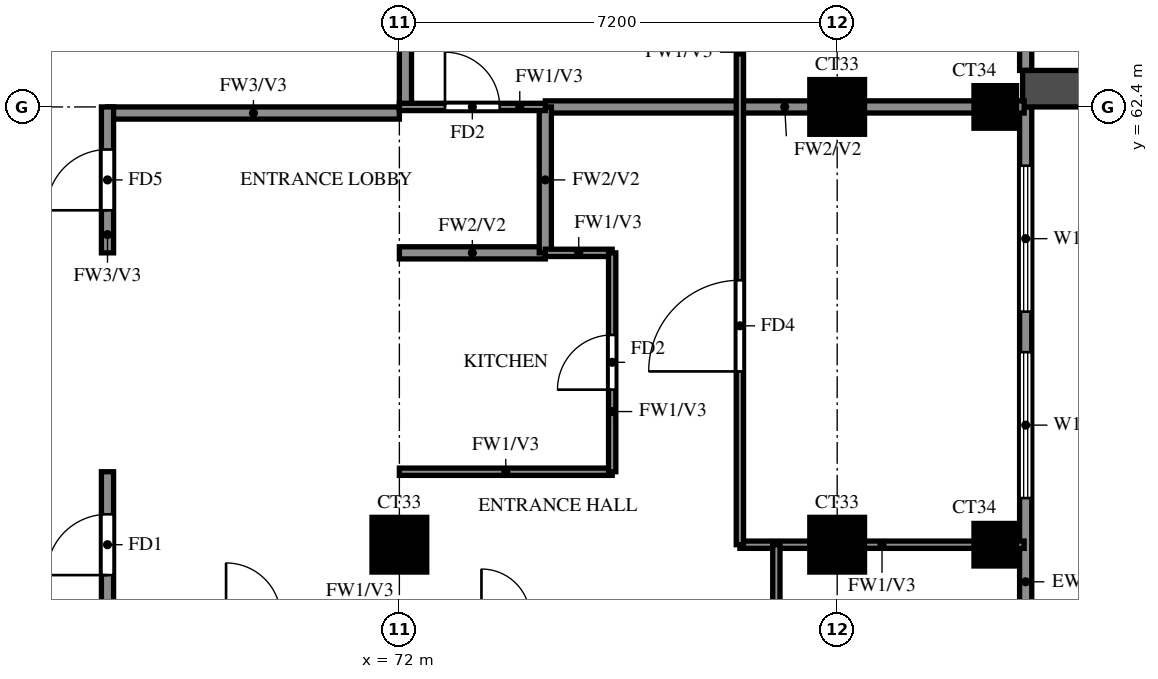
"""IFC4 building model, lengths in metres.
Left out: names, types, materials, properties, quantities, classifications, styles, units other than length and angle.
Written with IfcOpenShell. Run it as: python <this file> out.ifc"""

import sys

from ifc_helpers import new_model, si_unit, direction, frame, frame_2d, origin, origin_2d, place, context, subcontext, project, spatial, rectangle, extrude, source, transform, mapped, element, fill, save


model = new_model("IFC4")
c1 = context("Model", 3, precision=1e-05, world=origin(), true_north=direction((0.0, 1.0)))
c2 = subcontext(c1, "Body", "Model", "MODEL_VIEW")
j1 = project(units=[si_unit("LENGTHUNIT", "METRE"), si_unit("PLANEANGLEUNIT", "RADIAN")], contexts=[c1])
p1 = place(None, origin())
s1 = spatial("IfcSite", under=j1, at=p1, CompositionType="ELEMENT")
p2 = place(p1, origin())
s2 = spatial("IfcBuilding", under=s1, at=p2, CompositionType="ELEMENT")
p3 = place(p2, frame((0.0, 0.0, 229.0)))
s3 = spatial("IfcBuildingStorey", under=s2, at=p3, CompositionType="ELEMENT", Elevation=229.0)
m1 = source(origin(), c2, "Body", "SweptSolid", [
    extrude(rectangle(XDim=0.9, YDim=0.9, at=origin_2d()), origin(), (0.0, 0.0, 1.0), 3.22),
])
for number, where, z_axis, x_axis in (
    (1, (72.0, 55.2, 0.0), (0.0, 0.0, 1.0), (1.0, 0.0, 0.0)),
    (2, (79.2, 55.2, 0.0), (0.0, 0.0, 1.0), (1.0, 0.0, 0.0)),
):
    element("IfcColumn", number, at=place(p3, frame(where, z_axis=z_axis, x_axis=x_axis)), inside=s3, PredefinedType="COLUMN", context=c2, shape_type="MappedRepresentation", body=[
        mapped(m1, transform((0.0, 0.0, 0.0))),
    ])
m2 = source(origin(), c2, "Body", "SweptSolid", [
    extrude(rectangle(XDim=0.7, YDim=0.7, at=origin_2d()), origin(), (0.0, 0.0, 1.0), 3.22),
])
p4 = place(p3, frame((81.8, 55.2, 0.0), z_axis=(0.0, 0.0, 1.0), x_axis=(1.0, 0.0, 0.0)))
e3 = element("IfcColumn", 3, at=p4, inside=s3, PredefinedType="COLUMN", context=c2, shape_type="MappedRepresentation", body=[
    mapped(m2, transform((0.0, 0.0, 0.0))),
])
p5 = place(p3, frame((79.2, 62.4, 0.0), z_axis=(0.0, 0.0, 1.0), x_axis=(1.0, 0.0, 0.0)))
e4 = element("IfcColumn", 4, at=p5, inside=s3, PredefinedType="COLUMN", context=c2, shape_type="MappedRepresentation", body=[
    mapped(m1, transform((0.0, 0.0, 0.0))),
])
p6 = place(p3, frame((81.8, 62.4, 0.0), z_axis=(0.0, 0.0, 1.0), x_axis=(1.0, 0.0, 0.0)))
e5 = element("IfcColumn", 5, at=p6, inside=s3, PredefinedType="COLUMN", context=c2, shape_type="MappedRepresentation", body=[
    mapped(m2, transform((0.0, 0.0, 0.0))),
])
p7 = place(p3, frame((82.3, 48.2, 0.0), z_axis=(0.0, 0.0, 1.0), x_axis=(0.0, 1.0, 0.0)))
e6 = element("IfcWall", 6, at=p7, inside=s3, PredefinedType="SOLIDWALL", context=c2, shape_type="SweptSolid", body=[
    extrude(rectangle(XDim=14.2, YDim=0.2, at=frame_2d((7.1, 0.0))), origin(), (0.0, 0.0, 1.0), 3.22),
])
p8 = place(p7, frame((0.6, 0.0, 0.6)))
e7 = element("IfcOpeningElement", 7, at=p8, cuts=e6, PredefinedType="OPENING", context=c2, shape_type="SweptSolid", body=[
    extrude(rectangle(XDim=2.4, YDim=2.4, at=frame_2d((1.2, 1.2))), frame((0.0, 0.11, 0.0), z_axis=(0.0, -1.0, 0.0), x_axis=(1.0, 0.0, 0.0)), (0.0, 0.0, 1.0), 0.22),
])
p9 = place(p7, frame((4.75, 0.0, 1.5)))
e8 = element("IfcOpeningElement", 8, at=p9, cuts=e6, PredefinedType="OPENING", context=c2, shape_type="SweptSolid", body=[
    extrude(rectangle(XDim=0.9, YDim=0.9, at=frame_2d((0.45, 0.45))), frame((0.0, 0.11, 0.0), z_axis=(0.0, -1.0, 0.0), x_axis=(1.0, 0.0, 0.0)), (0.0, 0.0, 1.0), 0.22),
])
p10 = place(p7, frame((7.767, 0.0, 0.6)))
e9 = element("IfcOpeningElement", 9, at=p10, cuts=e6, PredefinedType="OPENING", context=c2, shape_type="SweptSolid", body=[
    extrude(rectangle(XDim=2.4, YDim=2.4, at=frame_2d((1.2, 1.2))), frame((0.0, 0.11, 0.0), z_axis=(0.0, -1.0, 0.0), x_axis=(1.0, 0.0, 0.0)), (0.0, 0.0, 1.0), 0.22),
])
p11 = place(p7, frame((10.833, 0.0, 0.6)))
e10 = element("IfcOpeningElement", 10, at=p11, cuts=e6, PredefinedType="OPENING", context=c2, shape_type="SweptSolid", body=[
    extrude(rectangle(XDim=2.4, YDim=2.4, at=frame_2d((1.2, 1.2))), frame((0.0, 0.11, 0.0), z_axis=(0.0, -1.0, 0.0), x_axis=(1.0, 0.0, 0.0)), (0.0, 0.0, 1.0), 0.22),
])
p12 = place(p3, frame((82.3, 63.0, 0.0), z_axis=(0.0, 0.0, 1.0), x_axis=(0.0, 1.0, 0.0)))
e11 = element("IfcWall", 11, at=p12, inside=s3, PredefinedType="SOLIDWALL", context=c2, shape_type="SweptSolid", body=[
    extrude(rectangle(XDim=6.0, YDim=0.2, at=frame_2d((3.0, 0.0))), origin(), (0.0, 0.0, 1.0), 3.22),
])
p13 = place(p12, frame((0.9, 0.0, 0.0)))
e12 = element("IfcOpeningElement", 12, at=p13, cuts=e11, PredefinedType="OPENING", context=c2, shape_type="SweptSolid", body=[
    extrude(rectangle(XDim=1.8, YDim=2.4, at=frame_2d((0.9, 1.2))), frame((0.0, 0.11, 0.0), z_axis=(0.0, -1.0, 0.0), x_axis=(1.0, 0.0, 0.0)), (0.0, 0.0, 1.0), 0.22),
])
p14 = place(p12, frame((3.5, 0.0, 0.6)))
e13 = element("IfcOpeningElement", 13, at=p14, cuts=e11, PredefinedType="OPENING", context=c2, shape_type="SweptSolid", body=[
    extrude(rectangle(XDim=1.8, YDim=2.4, at=frame_2d((0.9, 1.2))), frame((0.0, 0.11, 0.0), z_axis=(0.0, -1.0, 0.0), x_axis=(1.0, 0.0, 0.0)), (0.0, 0.0, 1.0), 0.22),
])
p15 = place(p3, frame((82.25, 62.7, 0.0), z_axis=(0.0, 0.0, 1.0), x_axis=(1.0, 0.0, 0.0)))
e14 = element("IfcWall", 14, at=p15, inside=s3, PredefinedType="SOLIDWALL", context=c2, shape_type="SweptSolid", body=[
    extrude(rectangle(XDim=2.85, YDim=0.6, at=frame_2d((1.425, 0.0))), origin(), (0.0, 0.0, 1.0), 2.85),
])
p16 = place(p3, frame((67.2, 62.3, 0.0), z_axis=(0.0, 0.0, 1.0), x_axis=(1.0, 0.0, 0.0)))
e15 = element("IfcWall", 15, at=p16, inside=s3, PredefinedType="SOLIDWALL", context=c2, shape_type="SweptSolid", body=[
    extrude(rectangle(XDim=4.8, YDim=0.2, at=frame_2d((2.4, 0.0))), origin(), (0.0, 0.0, 1.0), 3.22),
])
p17 = place(p3, frame((67.2, 45.6, 0.0), z_axis=(0.0, 0.0, 1.0), x_axis=(0.0, 1.0, 0.0)))
e16 = element("IfcWall", 16, at=p17, inside=s3, PredefinedType="SOLIDWALL", context=c2, shape_type="SweptSolid", body=[
    extrude(rectangle(XDim=10.8, YDim=0.2, at=frame_2d((5.4, 0.0))), origin(), (0.0, 0.0, 1.0), 3.22),
])
p18 = place(p17, frame((9.1, 0.0, 0.0)))
e17 = element("IfcOpeningElement", 17, at=p18, cuts=e16, PredefinedType="OPENING", context=c2, shape_type="SweptSolid", body=[
    extrude(rectangle(XDim=1.0, YDim=2.1, at=frame_2d((0.5, 1.05))), frame((0.0, 0.11, 0.0), z_axis=(0.0, -1.0, 0.0), x_axis=(1.0, 0.0, 0.0)), (0.0, 0.0, 1.0), 0.22),
])
p19 = place(p17, frame((0.7, 0.0, 0.0)))
e18 = element("IfcOpeningElement", 18, at=p19, cuts=e16, PredefinedType="OPENING", context=c2, shape_type="SweptSolid", body=[
    extrude(rectangle(XDim=1.0, YDim=2.1, at=frame_2d((0.5, 1.05))), frame((0.0, 0.11, 0.0), z_axis=(0.0, -1.0, 0.0), x_axis=(1.0, 0.0, 0.0)), (0.0, 0.0, 1.0), 0.22),
])
p20 = place(p3, frame((67.2, 60.0, 0.0), z_axis=(0.0, 0.0, 1.0), x_axis=(0.0, 1.0, 0.0)))
e19 = element("IfcWall", 19, at=p20, inside=s3, PredefinedType="SOLIDWALL", context=c2, shape_type="SweptSolid", body=[
    extrude(rectangle(XDim=2.4, YDim=0.2, at=frame_2d((1.2, 0.0))), origin(), (0.0, 0.0, 1.0), 3.22),
])
p21 = place(p20, frame((0.7, 0.0, 0.0)))
e20 = element("IfcOpeningElement", 20, at=p21, cuts=e19, PredefinedType="OPENING", context=c2, shape_type="SweptSolid", body=[
    extrude(rectangle(XDim=1.0, YDim=2.1, at=frame_2d((0.5, 1.05))), frame((0.0, 0.11, 0.0), z_axis=(0.0, -1.0, 0.0), x_axis=(1.0, 0.0, 0.0)), (0.0, 0.0, 1.0), 0.22),
])
p22 = place(p3, frame((72.1, 62.4, 0.0), z_axis=(0.0, 0.0, 1.0), x_axis=(0.0, 1.0, 0.0)))
e21 = element("IfcWall", 21, at=p22, inside=s3, PredefinedType="SOLIDWALL", context=c2, shape_type="SweptSolid", body=[
    extrude(rectangle(XDim=15.6, YDim=0.2, at=frame_2d((7.8, 0.0))), origin(), (0.0, 0.0, 1.0), 3.22),
])
p23 = place(p3, frame((72.0, 60.0, 0.0), z_axis=(0.0, 0.0, 1.0), x_axis=(1.0, 0.0, 0.0)))
e22 = element("IfcWall", 22, at=p23, inside=s3, PredefinedType="SOLIDWALL", context=c2, shape_type="SweptSolid", body=[
    extrude(rectangle(XDim=2.4, YDim=0.2, at=frame_2d((1.2, 0.0))), origin(), (0.0, 0.0, 1.0), 3.22),
])
p24 = place(p3, frame((74.4, 62.4, 0.0), z_axis=(0.0, 0.0, 1.0), x_axis=(1.0, 0.0, 0.0)))
e23 = element("IfcWall", 23, at=p24, inside=s3, PredefinedType="SOLIDWALL", context=c2, shape_type="SweptSolid", body=[
    extrude(rectangle(XDim=7.875, YDim=0.2, at=frame_2d((3.938, 0.0))), origin(), (0.0, 0.0, 1.0), 3.22),
])
p25 = place(p3, frame((74.4, 60.0, 0.0), z_axis=(0.0, 0.0, 1.0), x_axis=(0.0, 1.0, 0.0)))
e24 = element("IfcWall", 24, at=p25, inside=s3, PredefinedType="SOLIDWALL", context=c2, shape_type="SweptSolid", body=[
    extrude(rectangle(XDim=2.4, YDim=0.2, at=frame_2d((1.2, 0.0))), origin(), (0.0, 0.0, 1.0), 3.22),
])
p26 = place(p3, frame((77.6, 55.2, 0.0), z_axis=(0.0, 0.0, 1.0), x_axis=(1.0, 0.0, 0.0)))
e25 = element("IfcWall", 25, at=p26, inside=s3, PredefinedType="PARTITIONING", context=c2, shape_type="SweptSolid", body=[
    extrude(rectangle(XDim=4.675, YDim=0.12, at=frame_2d((2.337, 0.0))), origin(), (0.0, 0.0, 1.0), 3.22),
])
p27 = place(p3, frame((72.0, 56.4, 0.0), z_axis=(0.0, 0.0, 1.0), x_axis=(1.0, 0.0, 0.0)))
e26 = element("IfcWall", 26, at=p27, inside=s3, PredefinedType="PARTITIONING", context=c2, shape_type="SweptSolid", body=[
    extrude(rectangle(XDim=3.5, YDim=0.12, at=frame_2d((1.75, 0.0))), origin(), (0.0, 0.0, 1.0), 3.22),
])
p28 = place(p3, frame((74.4, 60.0, 0.0), z_axis=(0.0, 0.0, 1.0), x_axis=(1.0, 0.0, 0.0)))
e27 = element("IfcWall", 27, at=p28, inside=s3, PredefinedType="PARTITIONING", context=c2, shape_type="SweptSolid", body=[
    extrude(rectangle(XDim=1.1, YDim=0.12, at=frame_2d((0.55, 0.0))), origin(), (0.0, 0.0, 1.0), 3.22),
])
p29 = place(p3, frame((72.0, 62.4, 0.0), z_axis=(0.0, 0.0, 1.0), x_axis=(1.0, 0.0, 0.0)))
e28 = element("IfcWall", 28, at=p29, inside=s3, PredefinedType="PARTITIONING", context=c2, shape_type="SweptSolid", body=[
    extrude(rectangle(XDim=2.4, YDim=0.12, at=frame_2d((1.2, 0.0))), origin(), (0.0, 0.0, 1.0), 3.22),
])
p30 = place(p29, frame((0.75, 0.0, 0.0)))
e29 = element("IfcOpeningElement", 29, at=p30, cuts=e28, PredefinedType="OPENING", context=c2, shape_type="SweptSolid", body=[
    extrude(rectangle(XDim=0.9, YDim=2.1, at=frame_2d((0.45, 1.05))), frame((0.0, 0.07, 0.0), z_axis=(0.0, -1.0, 0.0), x_axis=(1.0, 0.0, 0.0)), (0.0, 0.0, 1.0), 0.14),
])
p31 = place(p3, frame((75.5, 56.4, 0.0), z_axis=(0.0, 0.0, 1.0), x_axis=(0.0, 1.0, 0.0)))
e30 = element("IfcWall", 30, at=p31, inside=s3, PredefinedType="PARTITIONING", context=c2, shape_type="SweptSolid", body=[
    extrude(rectangle(XDim=3.6, YDim=0.12, at=frame_2d((1.8, 0.0))), origin(), (0.0, 0.0, 1.0), 3.22),
])
p32 = place(p31, frame((1.35, 0.0, 0.0)))
e31 = element("IfcOpeningElement", 31, at=p32, cuts=e30, PredefinedType="OPENING", context=c2, shape_type="SweptSolid", body=[
    extrude(rectangle(XDim=0.9, YDim=2.1, at=frame_2d((0.45, 1.05))), frame((0.0, 0.07, 0.0), z_axis=(0.0, -1.0, 0.0), x_axis=(1.0, 0.0, 0.0)), (0.0, 0.0, 1.0), 0.14),
])
p33 = place(p3, frame((77.6, 55.2, 0.0), z_axis=(0.0, 0.0, 1.0), x_axis=(0.0, 1.0, 0.0)))
e32 = element("IfcWall", 32, at=p33, inside=s3, PredefinedType="PARTITIONING", context=c2, shape_type="SweptSolid", body=[
    extrude(rectangle(XDim=18.0, YDim=0.12, at=frame_2d((9.0, 0.0))), origin(), (0.0, 0.0, 1.0), 3.22),
])
p34 = place(p33, frame((2.85, 0.0, 0.0)))
e33 = element("IfcOpeningElement", 33, at=p34, cuts=e32, PredefinedType="OPENING", context=c2, shape_type="SweptSolid", body=[
    extrude(rectangle(XDim=1.5, YDim=2.1, at=frame_2d((0.75, 1.05))), frame((0.0, 0.07, 0.0), z_axis=(0.0, -1.0, 0.0), x_axis=(1.0, 0.0, 0.0)), (0.0, 0.0, 1.0), 0.14),
])
p35 = place(p33, frame((8.55, 0.0, 0.0)))
e34 = element("IfcOpeningElement", 34, at=p35, cuts=e32, PredefinedType="OPENING", context=c2, shape_type="SweptSolid", body=[
    extrude(rectangle(XDim=0.9, YDim=2.1, at=frame_2d((0.45, 1.05))), frame((0.0, 0.07, 0.0), z_axis=(0.0, -1.0, 0.0), x_axis=(1.0, 0.0, 0.0)), (0.0, 0.0, 1.0), 0.14),
])
p36 = place(p33, frame((12.15, 0.0, 0.0)))
e35 = element("IfcOpeningElement", 35, at=p36, cuts=e32, PredefinedType="OPENING", context=c2, shape_type="SweptSolid", body=[
    extrude(rectangle(XDim=0.9, YDim=2.1, at=frame_2d((0.45, 1.05))), frame((0.0, 0.07, 0.0), z_axis=(0.0, -1.0, 0.0), x_axis=(1.0, 0.0, 0.0)), (0.0, 0.0, 1.0), 0.14),
])
p37 = place(p33, frame((15.75, 0.0, 0.0)))
e36 = element("IfcOpeningElement", 36, at=p37, cuts=e32, PredefinedType="OPENING", context=c2, shape_type="SweptSolid", body=[
    extrude(rectangle(XDim=0.9, YDim=2.1, at=frame_2d((0.45, 1.05))), frame((0.0, 0.07, 0.0), z_axis=(0.0, -1.0, 0.0), x_axis=(1.0, 0.0, 0.0)), (0.0, 0.0, 1.0), 0.14),
])
p38 = place(p3, frame((78.2, 51.6, 0.0), z_axis=(0.0, 0.0, 1.0), x_axis=(0.0, 1.0, 0.0)))
e37 = element("IfcWall", 37, at=p38, inside=s3, PredefinedType="PARTITIONING", context=c2, shape_type="SweptSolid", body=[
    extrude(rectangle(XDim=3.6, YDim=0.12, at=frame_2d((1.8, 0.0))), origin(), (0.0, 0.0, 1.0), 3.22),
])
p39 = place(p10, origin())
e38 = element("IfcWindow", 38, at=p39, inside=s3, PartitioningType="DOUBLE_PANEL_VERTICAL", PredefinedType="WINDOW", context=c2, shape_type="SweptSolid", body=[
    extrude(rectangle(XDim=2.4, YDim=2.4, at=frame_2d((1.2, 1.2))), frame((0.0, 0.03, 0.0), z_axis=(0.0, -1.0, 0.0), x_axis=(1.0, 0.0, 0.0)), (0.0, 0.0, 1.0), 0.06),
])
fill(e9, e38)
p40 = place(p11, origin())
e39 = element("IfcWindow", 39, at=p40, inside=s3, PartitioningType="DOUBLE_PANEL_VERTICAL", PredefinedType="WINDOW", context=c2, shape_type="SweptSolid", body=[
    extrude(rectangle(XDim=2.4, YDim=2.4, at=frame_2d((1.2, 1.2))), frame((0.0, 0.03, 0.0), z_axis=(0.0, -1.0, 0.0), x_axis=(1.0, 0.0, 0.0)), (0.0, 0.0, 1.0), 0.06),
])
fill(e10, e39)
p41 = place(p18, origin())
e40 = element("IfcDoor", 40, at=p41, inside=s3, OperationType="SINGLE_SWING_LEFT", PredefinedType="DOOR", context=c2, shape_type="SweptSolid", body=[
    extrude(rectangle(XDim=1.0, YDim=2.1, at=frame_2d((0.5, 1.05))), frame((0.0, 0.025, 0.0), z_axis=(0.0, -1.0, 0.0), x_axis=(1.0, 0.0, 0.0)), (0.0, 0.0, 1.0), 0.05),
])
fill(e17, e40)
p42 = place(p34, origin())
e41 = element("IfcDoor", 41, at=p42, inside=s3, OperationType="SINGLE_SWING_LEFT", PredefinedType="DOOR", context=c2, shape_type="SweptSolid", body=[
    extrude(rectangle(XDim=1.5, YDim=2.1, at=frame_2d((0.75, 1.05))), frame((0.0, 0.025, 0.0), z_axis=(0.0, -1.0, 0.0), x_axis=(1.0, 0.0, 0.0)), (0.0, 0.0, 1.0), 0.05),
])
fill(e33, e41)
p43 = place(p32, origin())
e42 = element("IfcDoor", 42, at=p43, inside=s3, OperationType="SINGLE_SWING_LEFT", PredefinedType="DOOR", context=c2, shape_type="SweptSolid", body=[
    extrude(rectangle(XDim=0.9, YDim=2.1, at=frame_2d((0.45, 1.05))), frame((0.0, 0.025, 0.0), z_axis=(0.0, -1.0, 0.0), x_axis=(1.0, 0.0, 0.0)), (0.0, 0.0, 1.0), 0.05),
])
fill(e31, e42)
p44 = place(p30, origin())
e43 = element("IfcDoor", 43, at=p44, inside=s3, OperationType="SINGLE_SWING_LEFT", PredefinedType="DOOR", context=c2, shape_type="SweptSolid", body=[
    extrude(rectangle(XDim=0.9, YDim=2.1, at=frame_2d((0.45, 1.05))), frame((0.0, 0.025, 0.0), z_axis=(0.0, -1.0, 0.0), x_axis=(1.0, 0.0, 0.0)), (0.0, 0.0, 1.0), 0.05),
])
fill(e29, e43)
p45 = place(p21, origin())
e44 = element("IfcDoor", 44, at=p45, inside=s3, OperationType="SINGLE_SWING_RIGHT", PredefinedType="DOOR", context=c2, shape_type="SweptSolid", body=[
    extrude(rectangle(XDim=1.0, YDim=2.1, at=frame_2d((0.5, 1.05))), frame((0.0, 0.025, 0.0), z_axis=(0.0, -1.0, 0.0), x_axis=(1.0, 0.0, 0.0)), (0.0, 0.0, 1.0), 0.05),
])
fill(e20, e44)
save(model, sys.argv[1])
